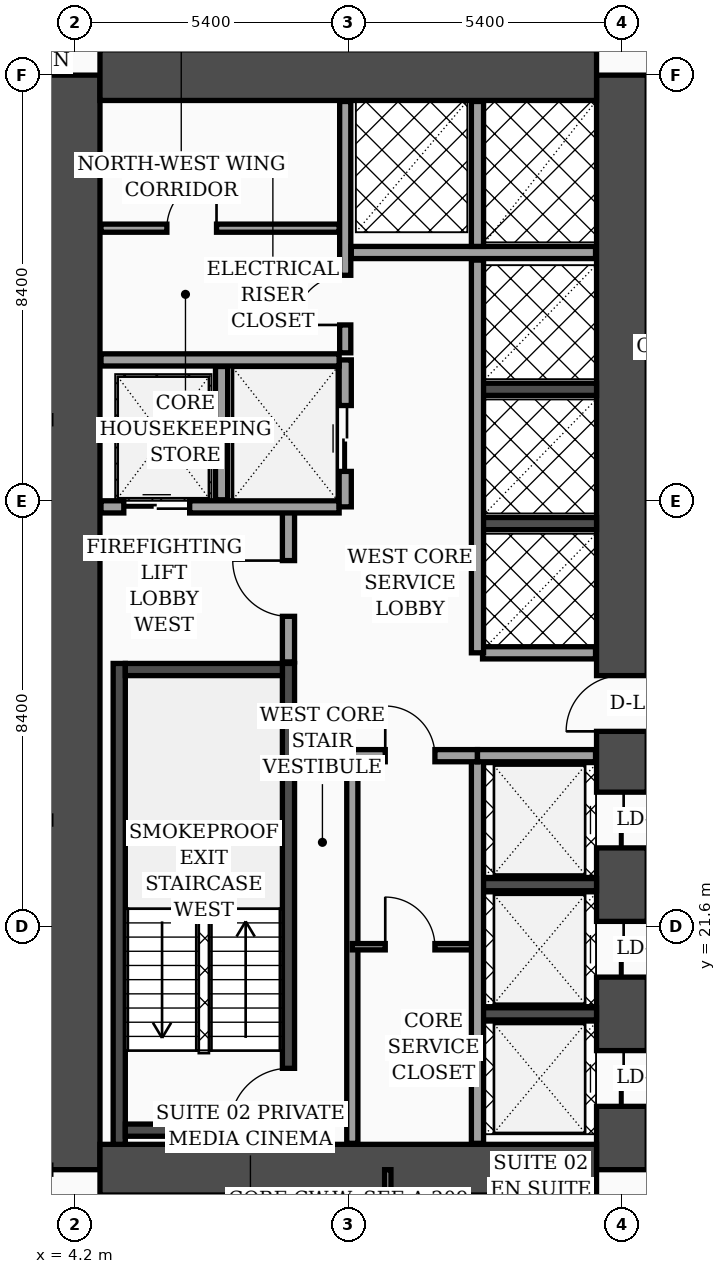
"""IFC4 building model, lengths in metres.
Left out: names, types, materials, properties, quantities, classifications, styles, units other than length and angle.
Written with IfcOpenShell. Run it as: python <this file> out.ifc"""

import sys

from ifc_helpers import new_model, si_unit, direction, frame, frame_2d, origin, place, context, subcontext, project, spatial, rectangle, extrude, element, fill, save


model = new_model("IFC4")
c1 = context("Model", 3, precision=1e-05, world=origin(), true_north=direction((0.0, 1.0)))
c2 = subcontext(c1, "Body", "Model", "MODEL_VIEW")
j1 = project(units=[si_unit("LENGTHUNIT", "METRE"), si_unit("PLANEANGLEUNIT", "RADIAN")], contexts=[c1])
p1 = place(None, origin())
s1 = spatial("IfcSite", under=j1, at=p1, CompositionType="ELEMENT")
p2 = place(p1, origin())
s2 = spatial("IfcBuilding", under=s1, at=p2, CompositionType="ELEMENT")
p3 = place(p2, frame((0.0, 0.0, 85.0)))
s3 = spatial("IfcBuildingStorey", under=s2, at=p3, CompositionType="ELEMENT", Elevation=85.0)
p4 = place(p3, frame((4.2, 16.8, 0.0), z_axis=(0.0, 0.0, 1.0), x_axis=(0.0, 1.0, 0.0)))
e1 = element("IfcWall", 1, at=p4, inside=s3, PredefinedType="SHEAR", context=c2, shape_type="SweptSolid", body=[
    extrude(rectangle(XDim=21.6, YDim=1.0, at=frame_2d((10.8, 0.0))), origin(), (0.0, 0.0, 1.0), 3.56),
])
p5 = place(p3, frame((15.0, 16.8, 0.0), z_axis=(0.0, 0.0, 1.0), x_axis=(0.0, 1.0, 0.0)))
e2 = element("IfcWall", 2, at=p5, inside=s3, PredefinedType="SHEAR", context=c2, shape_type="SweptSolid", body=[
    extrude(rectangle(XDim=21.6, YDim=1.0, at=frame_2d((10.8, 0.0))), origin(), (0.0, 0.0, 1.0), 3.56),
])
p6 = place(p5, frame((8.65, 0.0, 0.0)))
e3 = element("IfcOpeningElement", 3, at=p6, cuts=e2, PredefinedType="OPENING", context=c2, shape_type="SweptSolid", body=[
    extrude(rectangle(XDim=1.1, YDim=2.2, at=frame_2d((0.55, 1.1))), frame((0.0, 0.51, 0.0), z_axis=(0.0, -1.0, 0.0), x_axis=(1.0, 0.0, 0.0)), (0.0, 0.0, 1.0), 1.02),
])
p7 = place(p5, frame((1.25, 0.0, 0.0)))
e4 = element("IfcOpeningElement", 4, at=p7, cuts=e2, PredefinedType="OPENING", context=c2, shape_type="SweptSolid", body=[
    extrude(rectangle(XDim=1.1, YDim=2.2, at=frame_2d((0.55, 1.1))), frame((0.0, 0.51, 0.0), z_axis=(0.0, -1.0, 0.0), x_axis=(1.0, 0.0, 0.0)), (0.0, 0.0, 1.0), 1.02),
])
p8 = place(p5, frame((3.8, 0.0, 0.0)))
e5 = element("IfcOpeningElement", 5, at=p8, cuts=e2, PredefinedType="OPENING", context=c2, shape_type="SweptSolid", body=[
    extrude(rectangle(XDim=1.1, YDim=2.2, at=frame_2d((0.55, 1.1))), frame((0.0, 0.51, 0.0), z_axis=(0.0, -1.0, 0.0), x_axis=(1.0, 0.0, 0.0)), (0.0, 0.0, 1.0), 1.02),
])
p9 = place(p5, frame((6.35, 0.0, 0.0)))
e6 = element("IfcOpeningElement", 6, at=p9, cuts=e2, PredefinedType="OPENING", context=c2, shape_type="SweptSolid", body=[
    extrude(rectangle(XDim=1.1, YDim=2.2, at=frame_2d((0.55, 1.1))), frame((0.0, 0.51, 0.0), z_axis=(0.0, -1.0, 0.0), x_axis=(1.0, 0.0, 0.0)), (0.0, 0.0, 1.0), 1.02),
])
for number, where, z_axis, x_axis in (
    (7, (4.7, 38.4, 0.0), (0.0, 0.0, 1.0), (1.0, 0.0, 0.0)),
    (8, (4.7, 16.8, 0.0), (0.0, 0.0, 1.0), (1.0, 0.0, 0.0)),
):
    element("IfcWall", number, at=place(p3, frame(where, z_axis=z_axis, x_axis=x_axis)), inside=s3, PredefinedType="SHEAR", context=c2, shape_type="SweptSolid", body=[
        extrude(rectangle(XDim=9.8, YDim=1.0, at=frame_2d((4.9, 0.0))), origin(), (0.0, 0.0, 1.0), 3.56),
    ])
p10 = place(p3, frame((5.08, 17.3, 0.0), z_axis=(0.0, 0.0, 1.0), x_axis=(0.0, 1.0, 0.0)))
e9 = element("IfcWall", 9, at=p10, inside=s3, PredefinedType="SOLIDWALL", context=c2, shape_type="SweptSolid", body=[
    extrude(rectangle(XDim=9.49, YDim=0.24, at=frame_2d((4.745, 0.0))), origin(), (0.0, 0.0, 1.0), 3.56),
])
p11 = place(p3, frame((8.42, 17.3, 0.0), z_axis=(0.0, 0.0, 1.0), x_axis=(0.0, 1.0, 0.0)))
e10 = element("IfcWall", 10, at=p11, inside=s3, PredefinedType="SOLIDWALL", context=c2, shape_type="SweptSolid", body=[
    extrude(rectangle(XDim=9.49, YDim=0.24, at=frame_2d((4.745, 0.0))), origin(), (0.0, 0.0, 1.0), 3.56),
])
p12 = place(p11, frame((0.35, 0.0, 0.0)))
e11 = element("IfcOpeningElement", 11, at=p12, cuts=e10, PredefinedType="OPENING", context=c2, shape_type="SweptSolid", body=[
    extrude(rectangle(XDim=1.15, YDim=2.2, at=frame_2d((0.575, 1.1))), frame((0.0, 0.13, 0.0), z_axis=(0.0, -1.0, 0.0), x_axis=(1.0, 0.0, 0.0)), (0.0, 0.0, 1.0), 0.26),
])
for number, where, z_axis, x_axis in (
    (12, (5.2, 17.58, 0.0), (0.0, 0.0, 1.0), (1.0, 0.0, 0.0)),
    (13, (5.2, 26.67, 0.0), (0.0, 0.0, 1.0), (1.0, 0.0, 0.0)),
):
    element("IfcWall", number, at=place(p3, frame(where, z_axis=z_axis, x_axis=x_axis)), inside=s3, PredefinedType="SOLIDWALL", context=c2, shape_type="SweptSolid", body=[
        extrude(rectangle(XDim=3.1, YDim=0.24, at=frame_2d((1.55, 0.0))), origin(), (0.0, 0.0, 1.0), 3.56),
    ])
for number, where, z_axis, x_axis in (
    (14, (12.18, 19.875, 0.0), (0.0, 0.0, 1.0), (1.0, 0.0, 0.0)),
    (15, (12.18, 22.425, 0.0), (0.0, 0.0, 1.0), (1.0, 0.0, 0.0)),
    (16, (12.18, 29.55, 0.0), (0.0, 0.0, 1.0), (1.0, 0.0, 0.0)),
    (17, (12.18, 32.2, 0.0), (0.0, 0.0, 1.0), (1.0, 0.0, 0.0)),
):
    element("IfcWall", number, at=place(p3, frame(where, z_axis=z_axis, x_axis=x_axis)), inside=s3, PredefinedType="SOLIDWALL", context=c2, shape_type="SweptSolid", body=[
        extrude(rectangle(XDim=2.32, YDim=0.24, at=frame_2d((1.16, 0.0))), origin(), (0.0, 0.0, 1.0), 3.56),
    ])
p13 = place(p3, frame((8.42, 26.82, 0.0), z_axis=(0.0, 0.0, 1.0), x_axis=(0.0, 1.0, 0.0)))
e18 = element("IfcWall", 18, at=p13, inside=s3, PredefinedType="SOLIDWALL", context=c2, shape_type="SweptSolid", body=[
    extrude(rectangle(XDim=3.0, YDim=0.24, at=frame_2d((1.5, 0.0))), origin(), (0.0, 0.0, 1.0), 3.56),
])
p14 = place(p13, frame((0.9, 0.0, 0.0)))
e19 = element("IfcOpeningElement", 19, at=p14, cuts=e18, PredefinedType="OPENING", context=c2, shape_type="SweptSolid", body=[
    extrude(rectangle(XDim=1.1, YDim=2.2, at=frame_2d((0.55, 1.1))), frame((0.0, 0.13, 0.0), z_axis=(0.0, -1.0, 0.0), x_axis=(1.0, 0.0, 0.0)), (0.0, 0.0, 1.0), 0.26),
])
p15 = place(p3, frame((4.72, 29.88, 0.0), z_axis=(0.0, 0.0, 1.0), x_axis=(1.0, 0.0, 0.0)))
e20 = element("IfcWall", 20, at=p15, inside=s3, PredefinedType="SOLIDWALL", context=c2, shape_type="SweptSolid", body=[
    extrude(rectangle(XDim=4.7, YDim=0.24, at=frame_2d((2.35, 0.0))), origin(), (0.0, 0.0, 1.0), 3.56),
])
p16 = place(p15, frame((0.45, 0.0, 0.0)))
e21 = element("IfcOpeningElement", 21, at=p16, cuts=e20, PredefinedType="OPENING", context=c2, shape_type="SweptSolid", body=[
    extrude(rectangle(XDim=1.3, YDim=2.35, at=frame_2d((0.65, 1.175))), frame((0.0, 0.13, 0.0), z_axis=(0.0, -1.0, 0.0), x_axis=(1.0, 0.0, 0.0)), (0.0, 0.0, 1.0), 0.26),
])
p17 = place(p3, frame((7.1, 30.02, 0.0), z_axis=(0.0, 0.0, 1.0), x_axis=(0.0, 1.0, 0.0)))
e22 = element("IfcWall", 22, at=p17, inside=s3, PredefinedType="SOLIDWALL", context=c2, shape_type="SweptSolid", body=[
    extrude(rectangle(XDim=2.63, YDim=0.24, at=frame_2d((1.315, 0.0))), origin(), (0.0, 0.0, 1.0), 3.56),
])
p18 = place(p3, frame((9.54, 29.88, 0.0), z_axis=(0.0, 0.0, 1.0), x_axis=(0.0, 1.0, 0.0)))
e23 = element("IfcWall", 23, at=p18, inside=s3, PredefinedType="SOLIDWALL", context=c2, shape_type="SweptSolid", body=[
    extrude(rectangle(XDim=2.9, YDim=0.24, at=frame_2d((1.45, 0.0))), origin(), (0.0, 0.0, 1.0), 3.56),
])
p19 = place(p18, frame((0.7, 0.0, 0.0)))
e24 = element("IfcOpeningElement", 24, at=p19, cuts=e23, PredefinedType="OPENING", context=c2, shape_type="SweptSolid", body=[
    extrude(rectangle(XDim=1.3, YDim=2.35, at=frame_2d((0.65, 1.175))), frame((0.0, 0.13, 0.0), z_axis=(0.0, -1.0, 0.0), x_axis=(1.0, 0.0, 0.0)), (0.0, 0.0, 1.0), 0.26),
])
p20 = place(p3, frame((4.72, 32.78, 0.0), z_axis=(0.0, 0.0, 1.0), x_axis=(1.0, 0.0, 0.0)))
e25 = element("IfcWall", 25, at=p20, inside=s3, PredefinedType="SOLIDWALL", context=c2, shape_type="SweptSolid", body=[
    extrude(rectangle(XDim=4.7, YDim=0.24, at=frame_2d((2.35, 0.0))), origin(), (0.0, 0.0, 1.0), 3.56),
])
p21 = place(p3, frame((9.68, 17.32, 0.0), z_axis=(0.0, 0.0, 1.0), x_axis=(0.0, 1.0, 0.0)))
e26 = element("IfcWall", 26, at=p21, inside=s3, PredefinedType="SOLIDWALL", context=c2, shape_type="SweptSolid", body=[
    extrude(rectangle(XDim=7.68, YDim=0.22, at=frame_2d((3.84, 0.0))), origin(), (0.0, 0.0, 1.0), 3.56),
])
p22 = place(p3, frame((4.72, 35.38, 0.0), z_axis=(0.0, 0.0, 1.0), x_axis=(1.0, 0.0, 0.0)))
e27 = element("IfcWall", 27, at=p22, inside=s3, PredefinedType="PARTITIONING", context=c2, shape_type="SweptSolid", body=[
    extrude(rectangle(XDim=4.7, YDim=0.16, at=frame_2d((2.35, 0.0))), origin(), (0.0, 0.0, 1.0), 3.56),
])
p23 = place(p22, frame((1.3, 0.0, 0.0)))
e28 = element("IfcOpeningElement", 28, at=p23, cuts=e27, PredefinedType="OPENING", context=c2, shape_type="SweptSolid", body=[
    extrude(rectangle(XDim=0.98, YDim=2.15, at=frame_2d((0.49, 1.075))), frame((0.0, 0.09, 0.0), z_axis=(0.0, -1.0, 0.0), x_axis=(1.0, 0.0, 0.0)), (0.0, 0.0, 1.0), 0.18),
])
p24 = place(p3, frame((9.54, 32.92, 0.0), z_axis=(0.0, 0.0, 1.0), x_axis=(0.0, 1.0, 0.0)))
e29 = element("IfcWall", 29, at=p24, inside=s3, PredefinedType="SOLIDWALL", context=c2, shape_type="SweptSolid", body=[
    extrude(rectangle(XDim=4.96, YDim=0.22, at=frame_2d((2.48, 0.0))), origin(), (0.0, 0.0, 1.0), 3.56),
])
p25 = place(p24, frame((0.55, 0.0, 0.0)))
e30 = element("IfcOpeningElement", 30, at=p25, cuts=e29, PredefinedType="OPENING", context=c2, shape_type="SweptSolid", body=[
    extrude(rectangle(XDim=0.98, YDim=2.15, at=frame_2d((0.49, 1.075))), frame((0.0, 0.12, 0.0), z_axis=(0.0, -1.0, 0.0), x_axis=(1.0, 0.0, 0.0)), (0.0, 0.0, 1.0), 0.24),
])
p26 = place(p3, frame((9.68, 21.2, 0.0), z_axis=(0.0, 0.0, 1.0), x_axis=(1.0, 0.0, 0.0)))
e31 = element("IfcWall", 31, at=p26, inside=s3, PredefinedType="PARTITIONING", context=c2, shape_type="SweptSolid", body=[
    extrude(rectangle(XDim=2.47, YDim=0.125, at=frame_2d((1.235, 0.0))), origin(), (0.0, 0.0, 1.0), 3.56),
])
p27 = place(p26, frame((0.65, 0.0, 0.0)))
e32 = element("IfcOpeningElement", 32, at=p27, cuts=e31, PredefinedType="OPENING", context=c2, shape_type="SweptSolid", body=[
    extrude(rectangle(XDim=0.98, YDim=2.15, at=frame_2d((0.49, 1.075))), frame((0.0, 0.073, 0.0), z_axis=(0.0, -1.0, 0.0), x_axis=(1.0, 0.0, 0.0)), (0.0, 0.0, 1.0), 0.145),
])
p28 = place(p3, frame((12.15, 17.32, 0.0), z_axis=(0.0, 0.0, 1.0), x_axis=(0.0, 1.0, 0.0)))
e33 = element("IfcWall", 33, at=p28, inside=s3, PredefinedType="SOLIDWALL", context=c2, shape_type="SweptSolid", body=[
    extrude(rectangle(XDim=7.65, YDim=0.24, at=frame_2d((3.825, 0.0))), origin(), (0.0, 0.0, 1.0), 3.56),
])
p29 = place(p3, frame((9.68, 24.97, 0.0), z_axis=(0.0, 0.0, 1.0), x_axis=(1.0, 0.0, 0.0)))
e34 = element("IfcWall", 34, at=p29, inside=s3, PredefinedType="SOLIDWALL", context=c2, shape_type="SweptSolid", body=[
    extrude(rectangle(XDim=2.47, YDim=0.24, at=frame_2d((1.235, 0.0))), origin(), (0.0, 0.0, 1.0), 3.56),
])
p30 = place(p29, frame((0.65, 0.0, 0.0)))
e35 = element("IfcOpeningElement", 35, at=p30, cuts=e34, PredefinedType="OPENING", context=c2, shape_type="SweptSolid", body=[
    extrude(rectangle(XDim=0.98, YDim=2.15, at=frame_2d((0.49, 1.075))), frame((0.0, 0.13, 0.0), z_axis=(0.0, -1.0, 0.0), x_axis=(1.0, 0.0, 0.0)), (0.0, 0.0, 1.0), 0.26),
])
p31 = place(p3, frame((12.15, 24.97, 0.0), z_axis=(0.0, 0.0, 1.0), x_axis=(1.0, 0.0, 0.0)))
e36 = element("IfcWall", 36, at=p31, inside=s3, PredefinedType="SOLIDWALL", context=c2, shape_type="SweptSolid", body=[
    extrude(rectangle(XDim=2.33, YDim=0.24, at=frame_2d((1.165, 0.0))), origin(), (0.0, 0.0, 1.0), 2.84),
])
p32 = place(p3, frame((12.25, 27.0, 0.0), z_axis=(0.0, 0.0, 1.0), x_axis=(1.0, 0.0, 0.0)))
e37 = element("IfcWall", 37, at=p32, inside=s3, PredefinedType="SOLIDWALL", context=c2, shape_type="SweptSolid", body=[
    extrude(rectangle(XDim=2.23, YDim=0.24, at=frame_2d((1.115, 0.0))), origin(), (0.0, 0.0, 1.0), 3.56),
])
p33 = place(p3, frame((12.15, 27.0, 0.0), z_axis=(0.0, 0.0, 1.0), x_axis=(0.0, 1.0, 0.0)))
e38 = element("IfcWall", 38, at=p33, inside=s3, PredefinedType="SOLIDWALL", context=c2, shape_type="SweptSolid", body=[
    extrude(rectangle(XDim=7.75, YDim=0.24, at=frame_2d((3.875, 0.0))), origin(), (0.0, 0.0, 1.0), 3.56),
])
p34 = place(p3, frame((9.66, 34.9, 0.0), z_axis=(0.0, 0.0, 1.0), x_axis=(1.0, 0.0, 0.0)))
e39 = element("IfcWall", 39, at=p34, inside=s3, PredefinedType="SOLIDWALL", context=c2, shape_type="SweptSolid", body=[
    extrude(rectangle(XDim=4.82, YDim=0.24, at=frame_2d((2.41, 0.0))), origin(), (0.0, 0.0, 1.0), 3.56),
])
p35 = place(p3, frame((12.15, 35.02, 0.0), z_axis=(0.0, 0.0, 1.0), x_axis=(0.0, 1.0, 0.0)))
e40 = element("IfcWall", 40, at=p35, inside=s3, PredefinedType="SOLIDWALL", context=c2, shape_type="SweptSolid", body=[
    extrude(rectangle(XDim=2.86, YDim=0.24, at=frame_2d((1.43, 0.0))), origin(), (0.0, 0.0, 1.0), 3.56),
])
p36 = place(p3, frame((10.38, 14.75, 0.0), z_axis=(0.0, 0.0, 1.0), x_axis=(0.0, 1.0, 0.0)))
e41 = element("IfcWall", 41, at=p36, inside=s3, PredefinedType="PARTITIONING", context=c2, shape_type="SweptSolid", body=[
    extrude(rectangle(XDim=2.05, YDim=0.125, at=frame_2d((1.025, 0.0))), origin(), (0.0, 0.0, 1.0), 3.56),
])
p37 = place(p3, frame((13.3, 2.44, 0.0), z_axis=(0.0, 0.0, 1.0), x_axis=(0.0, 1.0, 0.0)))
e42 = element("IfcWall", 42, at=p37, inside=s3, PredefinedType="PARTITIONING", context=c2, shape_type="SweptSolid", body=[
    extrude(rectangle(XDim=14.36, YDim=0.18, at=frame_2d((7.18, 0.0))), origin(), (0.0, 0.0, 1.0), 3.04),
])
p38 = place(p37, frame((3.01, 0.0, 0.0)))
e43 = element("IfcOpeningElement", 43, at=p38, cuts=e42, PredefinedType="OPENING", context=c2, shape_type="SweptSolid", body=[
    extrude(rectangle(XDim=1.02, YDim=2.2, at=frame_2d((0.51, 1.1))), frame((0.0, 0.1, 0.0), z_axis=(0.0, -1.0, 0.0), x_axis=(1.0, 0.0, 0.0)), (0.0, 0.0, 1.0), 0.2),
])
p39 = place(p37, frame((9.95, 0.0, 0.0)))
e44 = element("IfcOpeningElement", 44, at=p39, cuts=e42, PredefinedType="OPENING", context=c2, shape_type="SweptSolid", body=[
    extrude(rectangle(XDim=1.02, YDim=2.2, at=frame_2d((0.51, 1.1))), frame((0.0, 0.1, 0.0), z_axis=(0.0, -1.0, 0.0), x_axis=(1.0, 0.0, 0.0)), (0.0, 0.0, 1.0), 0.2),
])
p40 = place(p14, origin())
e45 = element("IfcDoor", 45, at=p40, inside=s3, OperationType="SINGLE_SWING_RIGHT", PredefinedType="DOOR", context=c2, shape_type="SweptSolid", body=[
    extrude(rectangle(XDim=1.1, YDim=2.2, at=frame_2d((0.55, 1.1))), frame((0.0, 0.025, 0.0), z_axis=(0.0, -1.0, 0.0), x_axis=(1.0, 0.0, 0.0)), (0.0, 0.0, 1.0), 0.05),
])
fill(e19, e45)
p41 = place(p16, origin())
e46 = element("IfcDoor", 46, at=p41, inside=s3, OperationType="DOUBLE_DOOR_SLIDING", PredefinedType="DOOR", context=c2, shape_type="SweptSolid", body=[
    extrude(rectangle(XDim=1.3, YDim=2.35, at=frame_2d((0.65, 1.175))), frame((0.0, 0.025, 0.0), z_axis=(0.0, -1.0, 0.0), x_axis=(1.0, 0.0, 0.0)), (0.0, 0.0, 1.0), 0.05),
])
fill(e21, e46)
p42 = place(p19, origin())
e47 = element("IfcDoor", 47, at=p42, inside=s3, OperationType="DOUBLE_DOOR_SLIDING", PredefinedType="DOOR", context=c2, shape_type="SweptSolid", body=[
    extrude(rectangle(XDim=1.3, YDim=2.35, at=frame_2d((0.65, 1.175))), frame((0.0, 0.025, 0.0), z_axis=(0.0, -1.0, 0.0), x_axis=(1.0, 0.0, 0.0)), (0.0, 0.0, 1.0), 0.05),
])
fill(e24, e47)
p43 = place(p23, origin())
e48 = element("IfcDoor", 48, at=p43, inside=s3, OperationType="SINGLE_SWING_RIGHT", PredefinedType="DOOR", context=c2, shape_type="SweptSolid", body=[
    extrude(rectangle(XDim=0.98, YDim=2.15, at=frame_2d((0.49, 1.075))), frame((0.0, 0.025, 0.0), z_axis=(0.0, -1.0, 0.0), x_axis=(1.0, 0.0, 0.0)), (0.0, 0.0, 1.0), 0.05),
])
fill(e28, e48)
p44 = place(p25, origin())
e49 = element("IfcDoor", 49, at=p44, inside=s3, OperationType="SINGLE_SWING_LEFT", PredefinedType="DOOR", context=c2, shape_type="SweptSolid", body=[
    extrude(rectangle(XDim=0.98, YDim=2.15, at=frame_2d((0.49, 1.075))), frame((0.0, 0.025, 0.0), z_axis=(0.0, -1.0, 0.0), x_axis=(1.0, 0.0, 0.0)), (0.0, 0.0, 1.0), 0.05),
])
fill(e30, e49)
p45 = place(p27, origin())
e50 = element("IfcDoor", 50, at=p45, inside=s3, OperationType="SINGLE_SWING_LEFT", PredefinedType="DOOR", context=c2, shape_type="SweptSolid", body=[
    extrude(rectangle(XDim=0.98, YDim=2.15, at=frame_2d((0.49, 1.075))), frame((0.0, 0.025, 0.0), z_axis=(0.0, -1.0, 0.0), x_axis=(1.0, 0.0, 0.0)), (0.0, 0.0, 1.0), 0.05),
])
fill(e32, e50)
p46 = place(p30, origin())
e51 = element("IfcDoor", 51, at=p46, inside=s3, OperationType="SINGLE_SWING_LEFT", PredefinedType="DOOR", context=c2, shape_type="SweptSolid", body=[
    extrude(rectangle(XDim=0.98, YDim=2.15, at=frame_2d((0.49, 1.075))), frame((0.0, 0.025, 0.0), z_axis=(0.0, -1.0, 0.0), x_axis=(1.0, 0.0, 0.0)), (0.0, 0.0, 1.0), 0.05),
])
fill(e35, e51)
p47 = place(p12, origin())
e52 = element("IfcDoor", 52, at=p47, inside=s3, OperationType="SINGLE_SWING_LEFT", PredefinedType="DOOR", context=c2, shape_type="SweptSolid", body=[
    extrude(rectangle(XDim=1.15, YDim=2.2, at=frame_2d((0.575, 1.1))), frame((0.0, 0.025, 0.0), z_axis=(0.0, -1.0, 0.0), x_axis=(1.0, 0.0, 0.0)), (0.0, 0.0, 1.0), 0.05),
])
fill(e11, e52)
p48 = place(p6, origin())
e53 = element("IfcDoor", 53, at=p48, inside=s3, OperationType="SINGLE_SWING_LEFT", PredefinedType="DOOR", context=c2, shape_type="SweptSolid", body=[
    extrude(rectangle(XDim=1.1, YDim=2.2, at=frame_2d((0.55, 1.1))), frame((0.0, 0.025, 0.0), z_axis=(0.0, -1.0, 0.0), x_axis=(1.0, 0.0, 0.0)), (0.0, 0.0, 1.0), 0.05),
])
fill(e3, e53)
p49 = place(p7, origin())
e54 = element("IfcDoor", 54, at=p49, inside=s3, OperationType="DOUBLE_DOOR_SLIDING", PredefinedType="DOOR", context=c2, shape_type="SweptSolid", body=[
    extrude(rectangle(XDim=1.1, YDim=2.2, at=frame_2d((0.55, 1.1))), frame((0.0, 0.025, 0.0), z_axis=(0.0, -1.0, 0.0), x_axis=(1.0, 0.0, 0.0)), (0.0, 0.0, 1.0), 0.05),
])
fill(e4, e54)
p50 = place(p8, origin())
e55 = element("IfcDoor", 55, at=p50, inside=s3, OperationType="DOUBLE_DOOR_SLIDING", PredefinedType="DOOR", context=c2, shape_type="SweptSolid", body=[
    extrude(rectangle(XDim=1.1, YDim=2.2, at=frame_2d((0.55, 1.1))), frame((0.0, 0.025, 0.0), z_axis=(0.0, -1.0, 0.0), x_axis=(1.0, 0.0, 0.0)), (0.0, 0.0, 1.0), 0.05),
])
fill(e5, e55)
p51 = place(p9, origin())
e56 = element("IfcDoor", 56, at=p51, inside=s3, OperationType="DOUBLE_DOOR_SLIDING", PredefinedType="DOOR", context=c2, shape_type="SweptSolid", body=[
    extrude(rectangle(XDim=1.1, YDim=2.2, at=frame_2d((0.55, 1.1))), frame((0.0, 0.025, 0.0), z_axis=(0.0, -1.0, 0.0), x_axis=(1.0, 0.0, 0.0)), (0.0, 0.0, 1.0), 0.05),
])
fill(e6, e56)
save(model, sys.argv[1])
